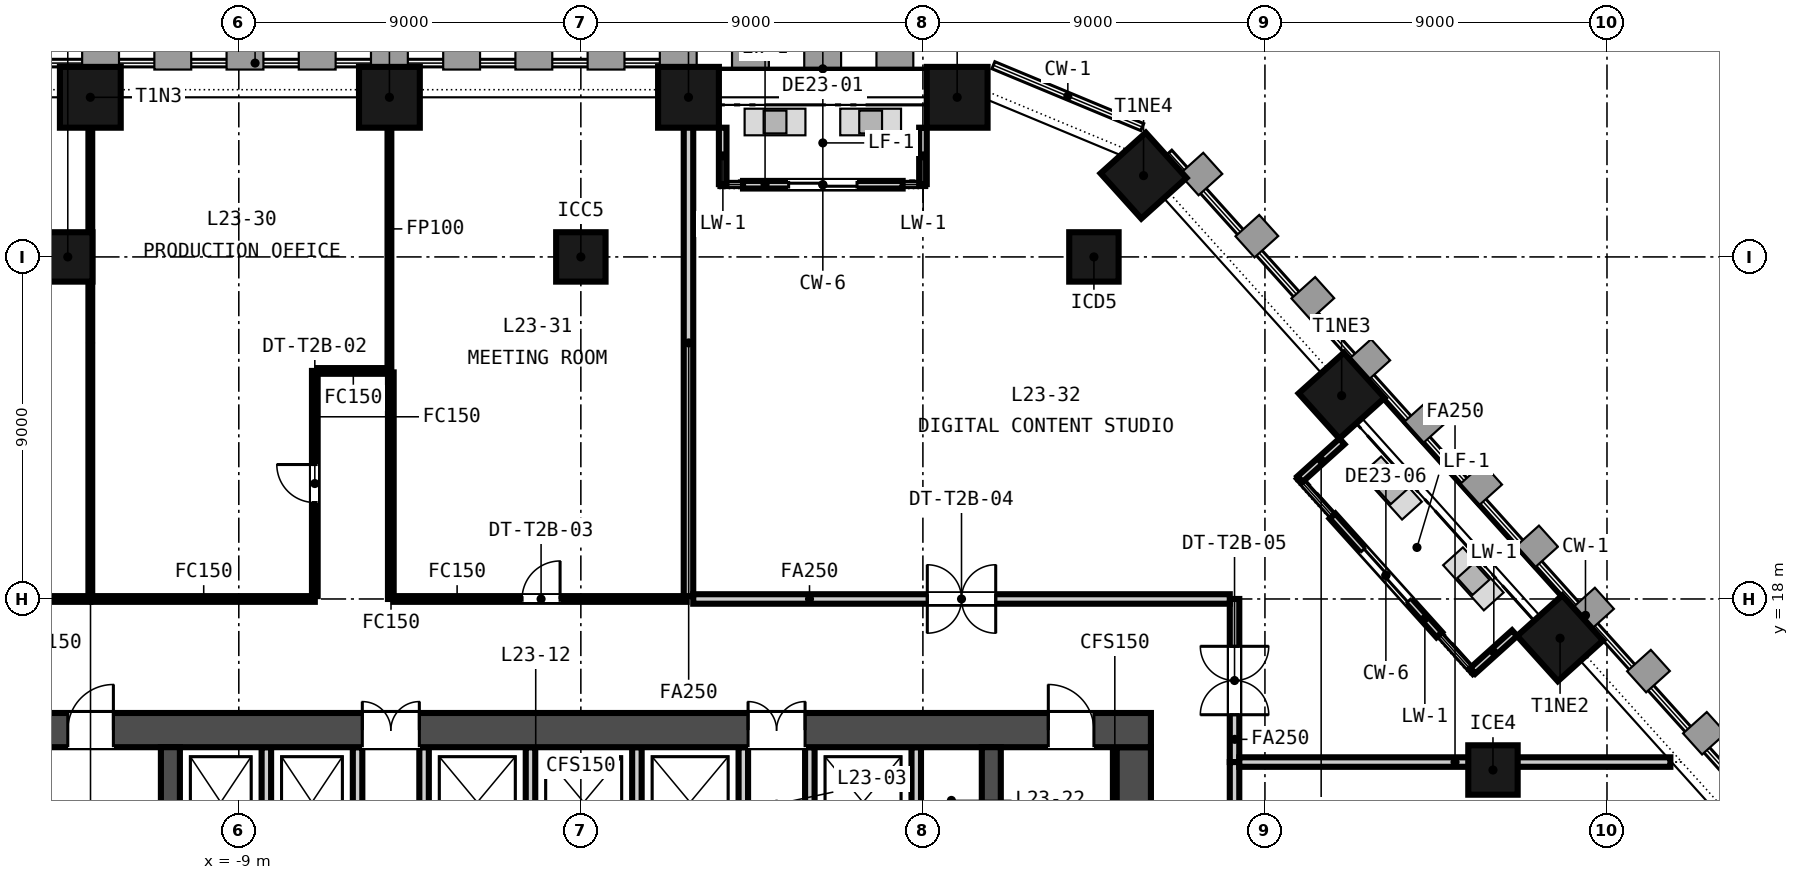
"""IFC4 building model, lengths in metres.
Left out: names, types, materials, properties, quantities, classifications, styles, units other than length and angle.
Written with IfcOpenShell. Run it as: python <this file> out.ifc"""

import sys

from ifc_helpers import new_model, si_unit, direction, frame, frame_2d, origin, origin_2d, place, context, subcontext, project, spatial, rectangle, extrude, element, fill, save


model = new_model("IFC4")
c1 = context("Model", 3, precision=1e-05, world=origin(), true_north=direction((0.0, 1.0)))
c2 = subcontext(c1, "Body", "Model", "MODEL_VIEW")
j1 = project(units=[si_unit("LENGTHUNIT", "METRE"), si_unit("PLANEANGLEUNIT", "RADIAN")], contexts=[c1])
p1 = place(None, origin())
s1 = spatial("IfcSite", under=j1, at=p1, CompositionType="ELEMENT")
p2 = place(p1, origin())
s2 = spatial("IfcBuilding", under=s1, at=p2, CompositionType="ELEMENT")
p3 = place(p2, frame((0.0, 0.0, 98.9)))
s3 = spatial("IfcBuildingStorey", under=s2, at=p3, CompositionType="ELEMENT", Elevation=98.9)
p4 = place(p3, frame((-15.0, 14.55, -0.15), z_axis=(0.0, 0.0, 1.0), x_axis=(1.0, 0.0, 0.0)))
e1 = element("IfcWall", 1, at=p4, inside=s3, PredefinedType="SOLIDWALL", context=c2, shape_type="SweptSolid", body=[
    extrude(rectangle(XDim=30.0, YDim=0.9, at=frame_2d((15.0, 0.0))), origin(), (0.0, 0.0, 1.0), 3.65),
])
p5 = place(p4, frame((9.25, 0.0, 0.15)))
e2 = element("IfcOpeningElement", 2, at=p5, cuts=e1, PredefinedType="OPENING", context=c2, shape_type="SweptSolid", body=[
    extrude(rectangle(XDim=1.5, YDim=2.1, at=frame_2d((0.75, 1.05))), frame((0.0, 0.46, 0.0), z_axis=(0.0, -1.0, 0.0), x_axis=(1.0, 0.0, 0.0)), (0.0, 0.0, 1.0), 0.92),
])
p6 = place(p4, frame((19.4, 0.0, 0.15)))
e3 = element("IfcOpeningElement", 3, at=p6, cuts=e1, PredefinedType="OPENING", context=c2, shape_type="SweptSolid", body=[
    extrude(rectangle(XDim=1.5, YDim=2.1, at=frame_2d((0.75, 1.05))), frame((0.0, 0.46, 0.0), z_axis=(0.0, -1.0, 0.0), x_axis=(1.0, 0.0, 0.0)), (0.0, 0.0, 1.0), 0.92),
])
p7 = place(p4, frame((1.5, 0.0, 0.15)))
e4 = element("IfcOpeningElement", 4, at=p7, cuts=e1, PredefinedType="OPENING", context=c2, shape_type="SweptSolid", body=[
    extrude(rectangle(XDim=1.2, YDim=2.1, at=frame_2d((0.6, 1.05))), frame((0.0, 0.46, 0.0), z_axis=(0.0, -1.0, 0.0), x_axis=(1.0, 0.0, 0.0)), (0.0, 0.0, 1.0), 0.92),
])
p8 = place(p4, frame((27.3, 0.0, 0.15)))
e5 = element("IfcOpeningElement", 5, at=p8, cuts=e1, PredefinedType="OPENING", context=c2, shape_type="SweptSolid", body=[
    extrude(rectangle(XDim=1.2, YDim=2.1, at=frame_2d((0.6, 1.05))), frame((0.0, 0.46, 0.0), z_axis=(0.0, -1.0, 0.0), x_axis=(1.0, 0.0, 0.0)), (0.0, 0.0, 1.0), 0.92),
])
p9 = place(p3, frame((14.55, 0.9, -0.15), z_axis=(0.0, 0.0, 1.0), x_axis=(0.0, 1.0, 0.0)))
e6 = element("IfcWall", 6, at=p9, inside=s3, PredefinedType="SOLIDWALL", context=c2, shape_type="SweptSolid", body=[
    extrude(rectangle(XDim=13.2, YDim=0.9, at=frame_2d((6.6, 0.0))), origin(), (0.0, 0.0, 1.0), 3.65),
])
for number, where, z_axis, x_axis in (
    (7, (-10.8, 0.9, -0.15), (0.0, 0.0, 1.0), (0.0, 1.0, 0.0)),
    (8, (10.8, 0.9, -0.15), (0.0, 0.0, 1.0), (0.0, 1.0, 0.0)),
):
    element("IfcWall", number, at=place(p3, frame(where, z_axis=z_axis, x_axis=x_axis)), inside=s3, PredefinedType="SOLIDWALL", context=c2, shape_type="SweptSolid", body=[
        extrude(rectangle(XDim=13.2, YDim=0.5, at=frame_2d((6.6, 0.0))), origin(), (0.0, 0.0, 1.0), 3.65),
    ])
for number, where, z_axis, x_axis in (
    (9, (9.902, 31.2, -0.15), (0.0, 0.0, 1.0), (-1.0, 0.0, 0.0)),
    (10, (2.832, 31.2, -0.15), (0.0, 0.0, 1.0), (-1.0, 0.0, 0.0)),
    (11, (-5.037, 31.2, -0.15), (0.0, 0.0, 1.0), (-1.0, 0.0, 0.0)),
    (12, (-12.907, 31.2, -0.15), (0.0, 0.0, 1.0), (-1.0, 0.0, 0.0)),
    (13, (25.765, 16.967, -0.15), (0.0, 0.0, 1.0), (-0.669, 0.743, 0.0)),
    (14, (20.018, 23.35, -0.15), (0.0, 0.0, 1.0), (-0.669, 0.743, 0.0)),
    (15, (14.806, 29.139, -0.15), (0.0, 0.0, 1.0), (-0.669, 0.743, 0.0)),
):
    element("IfcColumn", number, at=place(p3, frame(where, z_axis=z_axis, x_axis=x_axis)), inside=s3, PredefinedType="COLUMN", context=c2, shape_type="SweptSolid", body=[
        extrude(rectangle(XDim=1.6, YDim=1.6, at=origin_2d()), origin(), (0.0, 0.0, 1.0), 3.65),
    ])
for number, where, z_axis, x_axis in (
    (16, (-13.5, 27.0, -0.15), (0.0, 0.0, 1.0), (1.0, 0.0, 0.0)),
    (17, (0.0, 27.0, -0.15), (0.0, 0.0, 1.0), (1.0, 0.0, 0.0)),
    (18, (13.5, 27.0, -0.15), (0.0, 0.0, 1.0), (1.0, 0.0, 0.0)),
    (19, (24.0, 13.5, -0.15), (0.0, 0.0, 1.0), (1.0, 0.0, 0.0)),
):
    element("IfcColumn", number, at=place(p3, frame(where, z_axis=z_axis, x_axis=x_axis)), inside=s3, PredefinedType="COLUMN", context=c2, shape_type="SweptSolid", body=[
        extrude(rectangle(XDim=1.3, YDim=1.3, at=origin_2d()), origin(), (0.0, 0.0, 1.0), 3.65),
    ])
p10 = place(p3, frame((8.467, 28.9, 0.0), z_axis=(0.0, 0.0, 1.0), x_axis=(-1.0, 0.0, 0.0)))
e20 = element("IfcWall", 20, at=p10, inside=s3, PredefinedType="SOLIDWALL", context=c2, shape_type="SweptSolid", body=[
    extrude(rectangle(XDim=4.2, YDim=0.2, at=frame_2d((2.1, 0.0))), origin(), (0.0, 0.0, 1.0), 3.049),
])
p11 = place(p10, frame((1.2, 0.0, 0.0)))
e21 = element("IfcOpeningElement", 21, at=p11, cuts=e20, PredefinedType="OPENING", context=c2, shape_type="SweptSolid", body=[
    extrude(rectangle(XDim=1.8, YDim=2.4, at=frame_2d((0.9, 1.2))), frame((0.0, 0.11, 0.0), z_axis=(0.0, -1.0, 0.0), x_axis=(1.0, 0.0, 0.0)), (0.0, 0.0, 1.0), 0.22),
])
for number, where, z_axis, x_axis in (
    (22, (9.002, 30.4, 0.0), (0.0, 0.0, 1.0), (0.0, -1.0, 0.0)),
    (23, (3.732, 30.4, 0.0), (0.0, 0.0, 1.0), (0.0, -1.0, 0.0)),
):
    element("IfcWall", number, at=place(p3, frame(where, z_axis=z_axis, x_axis=x_axis)), inside=s3, PredefinedType="SOLIDWALL", context=c2, shape_type="SweptSolid", body=[
        extrude(rectangle(XDim=1.484, YDim=0.2, at=frame_2d((0.742, 0.0))), origin(), (0.0, 0.0, 1.0), 3.05),
    ])
p12 = place(p3, frame((22.588, 17.059, 0.0), z_axis=(0.0, 0.0, 1.0), x_axis=(-0.669138140895, 0.743138041282, 0.0)))
e24 = element("IfcWall", 24, at=p12, inside=s3, PredefinedType="SOLIDWALL", context=c2, shape_type="SweptSolid", body=[
    extrude(rectangle(XDim=4.2, YDim=0.2, at=frame_2d((2.1, 0.0))), origin(), (0.0, 0.0, 1.0), 3.05),
])
p13 = place(p12, frame((1.2, 0.0, 0.0)))
e25 = element("IfcOpeningElement", 25, at=p13, cuts=e24, PredefinedType="OPENING", context=c2, shape_type="SweptSolid", body=[
    extrude(rectangle(XDim=1.8, YDim=2.4, at=frame_2d((0.9, 1.2))), frame((0.0, 0.11, 0.0), z_axis=(0.0, -1.0, 0.0), x_axis=(1.0, 0.0, 0.0)), (0.0, 0.0, 1.0), 0.22),
])
p14 = place(p3, frame((24.569, 17.101, 0.0), z_axis=(0.0, 0.0, 1.0), x_axis=(-0.743155057383, -0.669119242501, 0.0)))
e26 = element("IfcWall", 26, at=p14, inside=s3, PredefinedType="SOLIDWALL", context=c2, shape_type="SweptSolid", body=[
    extrude(rectangle(XDim=1.484, YDim=0.2, at=frame_2d((0.742, 0.0))), origin(), (0.0, 0.0, 1.0), 2.821),
])
p15 = place(p3, frame((20.026, 22.146, 0.0), z_axis=(0.0, 0.0, 1.0), x_axis=(-0.743155057383, -0.669119242501, 0.0)))
e27 = element("IfcWall", 27, at=p15, inside=s3, PredefinedType="SOLIDWALL", context=c2, shape_type="SweptSolid", body=[
    extrude(rectangle(XDim=1.484, YDim=0.2, at=frame_2d((0.742, 0.0))), origin(), (0.0, 0.0, 1.0), 3.05),
])
for number, where, z_axis, x_axis in (
    (28, (-8.275, 11.3, 0.0), (0.0, 0.0, 1.0), (0.0, 1.0, 0.0)),
    (29, (-5.875, 11.3, 0.0), (0.0, 0.0, 1.0), (0.0, 1.0, 0.0)),
    (30, (-4.125, 11.3, 0.0), (0.0, 0.0, 1.0), (0.0, 1.0, 0.0)),
    (31, (-1.325, 11.3, 0.0), (0.0, 0.0, 1.0), (0.0, 1.0, 0.0)),
    (32, (1.475, 11.3, 0.0), (0.0, 0.0, 1.0), (0.0, 1.0, 0.0)),
    (33, (4.275, 11.3, 0.0), (0.0, 0.0, 1.0), (0.0, 1.0, 0.0)),
    (34, (6.025, 11.3, 0.0), (0.0, 0.0, 1.0), (0.0, 1.0, 0.0)),
    (35, (8.825, 11.3, 0.0), (0.0, 0.0, 1.0), (0.0, 1.0, 0.0)),
):
    element("IfcWall", number, at=place(p3, frame(where, z_axis=z_axis, x_axis=x_axis)), inside=s3, PredefinedType="PARTITIONING", context=c2, shape_type="SweptSolid", body=[
        extrude(rectangle(XDim=2.8, YDim=0.25, at=frame_2d((1.4, 0.0))), origin(), (0.0, 0.0, 1.0), 3.5),
    ])
p16 = place(p3, frame((14.05, 0.9, 0.0), z_axis=(0.0, 0.0, 1.0), x_axis=(0.0, 1.0, 0.0)))
e36 = element("IfcWall", 36, at=p16, inside=s3, PredefinedType="SOLIDWALL", context=c2, shape_type="SweptSolid", body=[
    extrude(rectangle(XDim=13.2, YDim=0.1, at=frame_2d((6.6, 0.0))), origin(), (0.0, 0.0, 1.0), 3.5),
])
p17 = place(p3, frame((-5.0, 23.962, 0.0), z_axis=(0.0, 0.0, 1.0), x_axis=(0.0, -1.0, 0.0)))
e37 = element("IfcWall", 37, at=p17, inside=s3, PredefinedType="PARTITIONING", context=c2, shape_type="SweptSolid", body=[
    extrude(rectangle(XDim=5.962, YDim=0.15, at=frame_2d((2.981, 0.0))), origin(), (0.0, 0.0, 1.0), 2.741),
])
p18 = place(p3, frame((17.2, 18.0, 0.0), z_axis=(0.0, 0.0, 1.0), x_axis=(0.0, -1.0, 0.0)))
e38 = element("IfcWall", 38, at=p18, inside=s3, PredefinedType="PARTITIONING", context=c2, shape_type="SweptSolid", body=[
    extrude(rectangle(XDim=4.291, YDim=0.25, at=frame_2d((2.146, 0.0))), origin(), (0.0, 0.0, 1.0), 2.741),
])
p19 = place(p18, frame((1.246, 0.0, 0.0)))
e39 = element("IfcOpeningElement", 39, at=p19, cuts=e38, PredefinedType="OPENING", context=c2, shape_type="SweptSolid", body=[
    extrude(rectangle(XDim=1.8, YDim=2.1, at=frame_2d((0.9, 1.05))), frame((0.0, 0.135, 0.0), z_axis=(0.0, -1.0, 0.0), x_axis=(1.0, 0.0, 0.0)), (0.0, 0.0, 1.0), 0.27),
])
p20 = place(p3, frame((17.2, 13.709, 0.0), z_axis=(0.0, 0.0, 1.0), x_axis=(0.0, -1.0, 0.0)))
e40 = element("IfcWall", 40, at=p20, inside=s3, PredefinedType="PARTITIONING", context=c2, shape_type="SweptSolid", body=[
    extrude(rectangle(XDim=16.897, YDim=0.25, at=frame_2d((8.448, 0.0))), origin(), (0.0, 0.0, 1.0), 2.741),
])
p21 = place(p20, frame((7.549, 0.0, 0.0)))
e41 = element("IfcOpeningElement", 41, at=p21, cuts=e40, PredefinedType="OPENING", context=c2, shape_type="SweptSolid", body=[
    extrude(rectangle(XDim=1.8, YDim=2.1, at=frame_2d((0.9, 1.05))), frame((0.0, 0.135, 0.0), z_axis=(0.0, -1.0, 0.0), x_axis=(1.0, 0.0, 0.0)), (0.0, 0.0, 1.0), 0.27),
])
p22 = place(p3, frame((-23.786, 18.0, 0.0), z_axis=(0.0, 0.0, 1.0), x_axis=(1.0, 0.0, 0.0)))
e42 = element("IfcWall", 42, at=p22, inside=s3, PredefinedType="PARTITIONING", context=c2, shape_type="SweptSolid", body=[
    extrude(rectangle(XDim=10.879, YDim=0.15, at=frame_2d((5.439, 0.0))), origin(), (0.0, 0.0, 1.0), 2.741),
])
p23 = place(p22, frame((4.54, 0.0, 0.0)))
e43 = element("IfcOpeningElement", 43, at=p23, cuts=e42, PredefinedType="OPENING", context=c2, shape_type="SweptSolid", body=[
    extrude(rectangle(XDim=1.8, YDim=2.1, at=frame_2d((0.9, 1.05))), frame((0.0, 0.085, 0.0), z_axis=(0.0, -1.0, 0.0), x_axis=(1.0, 0.0, 0.0)), (0.0, 0.0, 1.0), 0.17),
])
p24 = place(p3, frame((-12.907, 18.075, 0.0), z_axis=(0.0, 0.0, 1.0), x_axis=(0.0, 1.0, 0.0)))
e44 = element("IfcWall", 44, at=p24, inside=s3, PredefinedType="PARTITIONING", context=c2, shape_type="SweptSolid", body=[
    extrude(rectangle(XDim=13.325, YDim=0.1, at=frame_2d((6.663, 0.0))), origin(), (0.0, 0.0, 1.0), 2.741),
])
p25 = place(p3, frame((-12.857, 18.0, 0.0), z_axis=(0.0, 0.0, 1.0), x_axis=(1.0, 0.0, 0.0)))
e45 = element("IfcWall", 45, at=p25, inside=s3, PredefinedType="PARTITIONING", context=c2, shape_type="SweptSolid", body=[
    extrude(rectangle(XDim=5.857, YDim=0.15, at=frame_2d((2.928, 0.0))), origin(), (0.0, 0.0, 1.0), 2.741),
])
p26 = place(p3, frame((-7.0, 18.075, 0.0), z_axis=(0.0, 0.0, 1.0), x_axis=(0.0, 1.0, 0.0)))
e46 = element("IfcWall", 46, at=p26, inside=s3, PredefinedType="PARTITIONING", context=c2, shape_type="SweptSolid", body=[
    extrude(rectangle(XDim=5.925, YDim=0.15, at=frame_2d((2.962, 0.0))), origin(), (0.0, 0.0, 1.0), 2.741),
])
p27 = place(p26, frame((2.462, 0.0, 0.0)))
e47 = element("IfcOpeningElement", 47, at=p27, cuts=e46, PredefinedType="OPENING", context=c2, shape_type="SweptSolid", body=[
    extrude(rectangle(XDim=1.0, YDim=2.1, at=frame_2d((0.5, 1.05))), frame((0.0, 0.085, 0.0), z_axis=(0.0, -1.0, 0.0), x_axis=(1.0, 0.0, 0.0)), (0.0, 0.0, 1.0), 0.17),
])
p28 = place(p3, frame((-6.925, 24.0, 0.0), z_axis=(0.0, 0.0, 1.0), x_axis=(1.0, 0.0, 0.0)))
e48 = element("IfcWall", 48, at=p28, inside=s3, PredefinedType="PARTITIONING", context=c2, shape_type="SweptSolid", body=[
    extrude(rectangle(XDim=1.866, YDim=0.15, at=frame_2d((0.933, 0.0))), origin(), (0.0, 0.0, 1.0), 2.741),
])
p29 = place(p3, frame((-5.037, 24.075, 0.0), z_axis=(0.0, 0.0, 1.0), x_axis=(0.0, 1.0, 0.0)))
e49 = element("IfcWall", 49, at=p29, inside=s3, PredefinedType="PARTITIONING", context=c2, shape_type="SweptSolid", body=[
    extrude(rectangle(XDim=7.325, YDim=0.1, at=frame_2d((3.663, 0.0))), origin(), (0.0, 0.0, 1.0), 2.741),
])
p30 = place(p3, frame((-4.925, 18.0, 0.0), z_axis=(0.0, 0.0, 1.0), x_axis=(1.0, 0.0, 0.0)))
e50 = element("IfcWall", 50, at=p30, inside=s3, PredefinedType="PARTITIONING", context=c2, shape_type="SweptSolid", body=[
    extrude(rectangle(XDim=7.707, YDim=0.15, at=frame_2d((3.854, 0.0))), origin(), (0.0, 0.0, 1.0), 2.741),
])
p31 = place(p30, frame((3.378, 0.0, 0.0)))
e51 = element("IfcOpeningElement", 51, at=p31, cuts=e50, PredefinedType="OPENING", context=c2, shape_type="SweptSolid", body=[
    extrude(rectangle(XDim=1.0, YDim=2.1, at=frame_2d((0.5, 1.05))), frame((0.0, 0.085, 0.0), z_axis=(0.0, -1.0, 0.0), x_axis=(1.0, 0.0, 0.0)), (0.0, 0.0, 1.0), 0.17),
])
p32 = place(p3, frame((2.832, 18.075, 0.0), z_axis=(0.0, 0.0, 1.0), x_axis=(0.0, 1.0, 0.0)))
e52 = element("IfcWall", 52, at=p32, inside=s3, PredefinedType="PARTITIONING", context=c2, shape_type="SweptSolid", body=[
    extrude(rectangle(XDim=13.325, YDim=0.25, at=frame_2d((6.663, 0.0))), origin(), (0.0, 0.0, 1.0), 2.741),
])
p33 = place(p3, frame((2.957, 18.0, 0.0), z_axis=(0.0, 0.0, 1.0), x_axis=(1.0, 0.0, 0.0)))
e53 = element("IfcWall", 53, at=p33, inside=s3, PredefinedType="PARTITIONING", context=c2, shape_type="SweptSolid", body=[
    extrude(rectangle(XDim=14.118, YDim=0.25, at=frame_2d((7.059, 0.0))), origin(), (0.0, 0.0, 1.0), 2.741),
])
p34 = place(p33, frame((6.159, 0.0, 0.0)))
e54 = element("IfcOpeningElement", 54, at=p34, cuts=e53, PredefinedType="OPENING", context=c2, shape_type="SweptSolid", body=[
    extrude(rectangle(XDim=1.8, YDim=2.1, at=frame_2d((0.9, 1.05))), frame((0.0, 0.135, 0.0), z_axis=(0.0, -1.0, 0.0), x_axis=(1.0, 0.0, 0.0)), (0.0, 0.0, 1.0), 0.27),
])
p35 = place(p3, frame((17.325, 13.709, 0.0), z_axis=(0.0, 0.0, 1.0), x_axis=(1.0, 0.0, 0.0)))
e55 = element("IfcWall", 55, at=p35, inside=s3, PredefinedType="PARTITIONING", context=c2, shape_type="SweptSolid", body=[
    extrude(rectangle(XDim=11.343, YDim=0.25, at=frame_2d((5.671, 0.0))), origin(), (0.0, 0.0, 1.0), 2.741),
])
p36 = place(p11, origin())
e56 = element("IfcDoor", 56, at=p36, inside=s3, OperationType="SINGLE_SWING_LEFT", PredefinedType="DOOR", context=c2, shape_type="SweptSolid", body=[
    extrude(rectangle(XDim=1.8, YDim=2.4, at=frame_2d((0.9, 1.2))), frame((0.0, 0.025, 0.0), z_axis=(0.0, -1.0, 0.0), x_axis=(1.0, 0.0, 0.0)), (0.0, 0.0, 1.0), 0.05),
])
fill(e21, e56)
p37 = place(p13, origin())
e57 = element("IfcDoor", 57, at=p37, inside=s3, OperationType="SINGLE_SWING_LEFT", PredefinedType="DOOR", context=c2, shape_type="SweptSolid", body=[
    extrude(rectangle(XDim=1.8, YDim=2.4, at=frame_2d((0.9, 1.2))), frame((0.0, 0.025, 0.0), z_axis=(0.0, -1.0, 0.0), x_axis=(1.0, 0.0, 0.0)), (0.0, 0.0, 1.0), 0.05),
])
fill(e25, e57)
p38 = place(p5, origin())
e58 = element("IfcDoor", 58, at=p38, inside=s3, OperationType="DOUBLE_DOOR_SINGLE_SWING", PredefinedType="DOOR", context=c2, shape_type="SweptSolid", body=[
    extrude(rectangle(XDim=1.5, YDim=2.1, at=frame_2d((0.75, 1.05))), frame((0.0, 0.025, 0.0), z_axis=(0.0, -1.0, 0.0), x_axis=(1.0, 0.0, 0.0)), (0.0, 0.0, 1.0), 0.05),
])
fill(e2, e58)
p39 = place(p6, origin())
e59 = element("IfcDoor", 59, at=p39, inside=s3, OperationType="DOUBLE_DOOR_SINGLE_SWING", PredefinedType="DOOR", context=c2, shape_type="SweptSolid", body=[
    extrude(rectangle(XDim=1.5, YDim=2.1, at=frame_2d((0.75, 1.05))), frame((0.0, 0.025, 0.0), z_axis=(0.0, -1.0, 0.0), x_axis=(1.0, 0.0, 0.0)), (0.0, 0.0, 1.0), 0.05),
])
fill(e3, e59)
p40 = place(p7, origin())
e60 = element("IfcDoor", 60, at=p40, inside=s3, OperationType="SINGLE_SWING_RIGHT", PredefinedType="DOOR", context=c2, shape_type="SweptSolid", body=[
    extrude(rectangle(XDim=1.2, YDim=2.1, at=frame_2d((0.6, 1.05))), frame((0.0, 0.025, 0.0), z_axis=(0.0, -1.0, 0.0), x_axis=(1.0, 0.0, 0.0)), (0.0, 0.0, 1.0), 0.05),
])
fill(e4, e60)
p41 = place(p8, origin())
e61 = element("IfcDoor", 61, at=p41, inside=s3, OperationType="SINGLE_SWING_LEFT", PredefinedType="DOOR", context=c2, shape_type="SweptSolid", body=[
    extrude(rectangle(XDim=1.2, YDim=2.1, at=frame_2d((0.6, 1.05))), frame((0.0, 0.025, 0.0), z_axis=(0.0, -1.0, 0.0), x_axis=(1.0, 0.0, 0.0)), (0.0, 0.0, 1.0), 0.05),
])
fill(e5, e61)
p42 = place(p27, origin())
e62 = element("IfcDoor", 62, at=p42, inside=s3, OperationType="SINGLE_SWING_RIGHT", PredefinedType="DOOR", context=c2, shape_type="SweptSolid", body=[
    extrude(rectangle(XDim=1.0, YDim=2.1, at=frame_2d((0.5, 1.05))), frame((0.0, 0.025, 0.0), z_axis=(0.0, -1.0, 0.0), x_axis=(1.0, 0.0, 0.0)), (0.0, 0.0, 1.0), 0.05),
])
fill(e47, e62)
p43 = place(p31, origin())
e63 = element("IfcDoor", 63, at=p43, inside=s3, OperationType="SINGLE_SWING_RIGHT", PredefinedType="DOOR", context=c2, shape_type="SweptSolid", body=[
    extrude(rectangle(XDim=1.0, YDim=2.1, at=frame_2d((0.5, 1.05))), frame((0.0, 0.025, 0.0), z_axis=(0.0, -1.0, 0.0), x_axis=(1.0, 0.0, 0.0)), (0.0, 0.0, 1.0), 0.05),
])
fill(e51, e63)
p44 = place(p34, origin())
e64 = element("IfcDoor", 64, at=p44, inside=s3, OperationType="DOUBLE_DOOR_DOUBLE_SWING", PredefinedType="DOOR", context=c2, shape_type="SweptSolid", body=[
    extrude(rectangle(XDim=1.8, YDim=2.1, at=frame_2d((0.9, 1.05))), frame((0.0, 0.025, 0.0), z_axis=(0.0, -1.0, 0.0), x_axis=(1.0, 0.0, 0.0)), (0.0, 0.0, 1.0), 0.05),
])
fill(e54, e64)
p45 = place(p19, origin())
e65 = element("IfcDoor", 65, at=p45, inside=s3, OperationType="DOUBLE_DOOR_DOUBLE_SWING", PredefinedType="DOOR", context=c2, shape_type="SweptSolid", body=[
    extrude(rectangle(XDim=1.8, YDim=2.1, at=frame_2d((0.9, 1.05))), frame((0.0, 0.025, 0.0), z_axis=(0.0, -1.0, 0.0), x_axis=(1.0, 0.0, 0.0)), (0.0, 0.0, 1.0), 0.05),
])
fill(e39, e65)
save(model, sys.argv[1])
